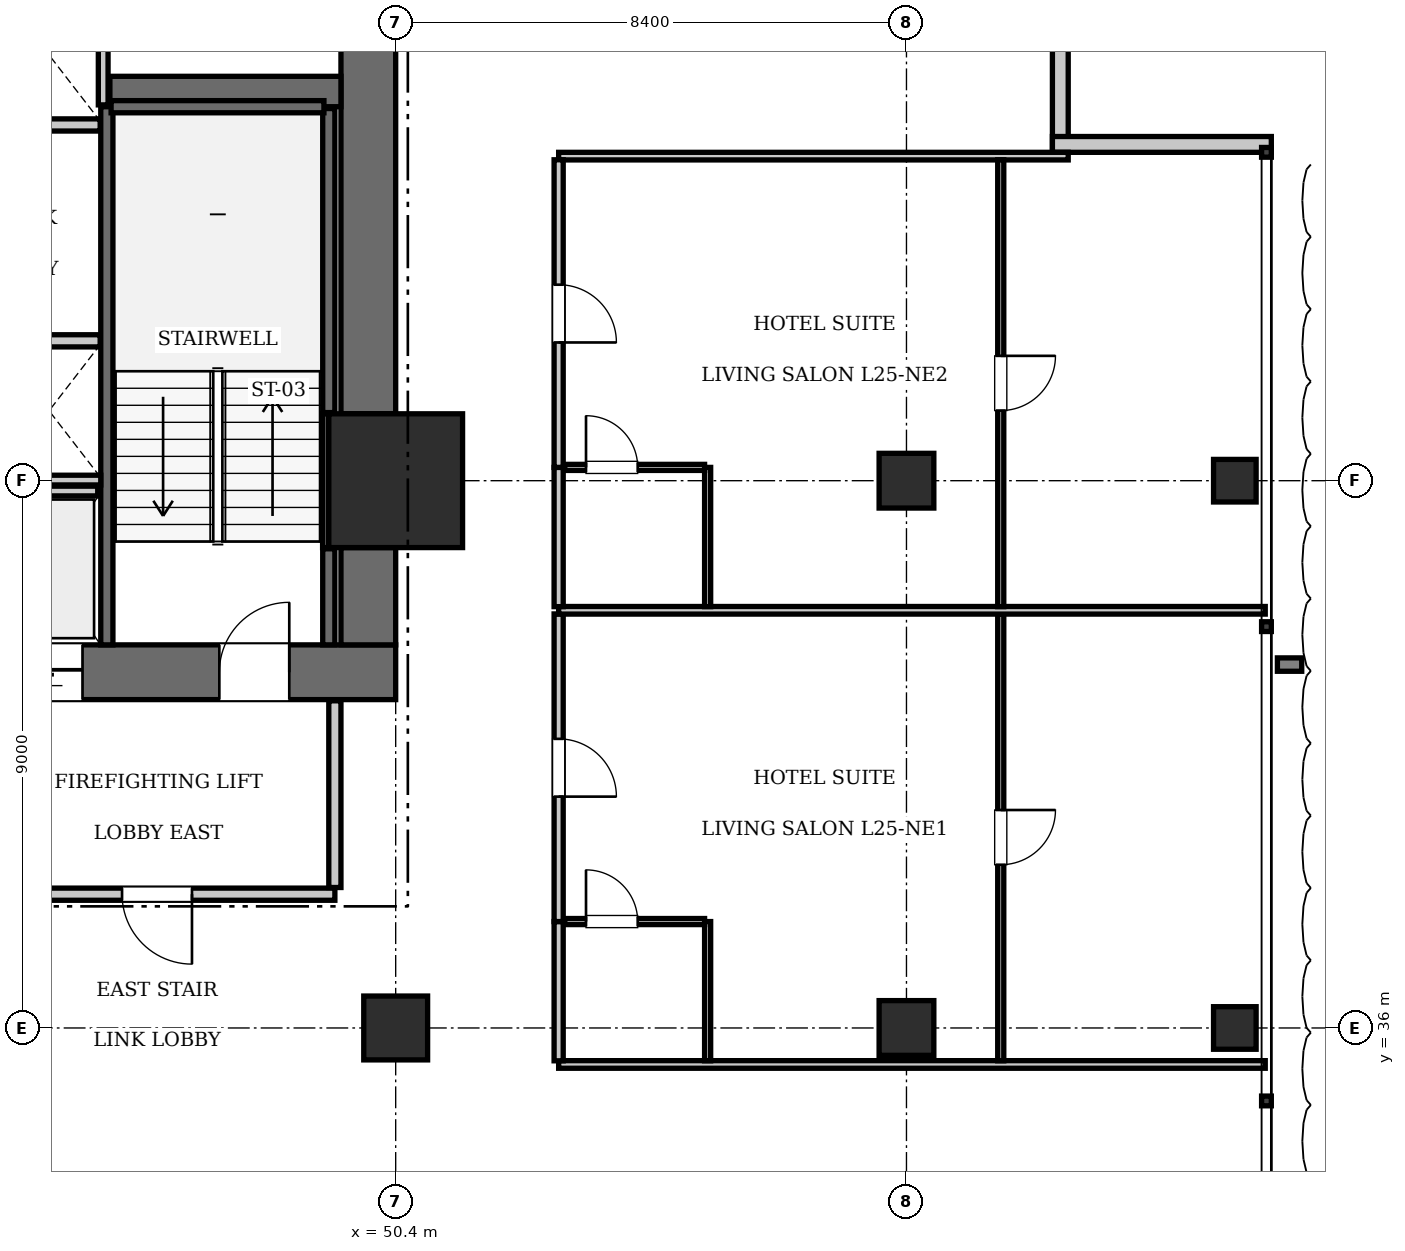
"""IFC4 building model, lengths in metres.
Left out: names, types, materials, properties, quantities, classifications, styles, units other than length and angle.
Written with IfcOpenShell. Run it as: python <this file> out.ifc"""

import sys

from ifc_helpers import new_model, si_unit, direction, frame, frame_2d, origin, origin_2d, place, context, subcontext, project, spatial, rectangle, i_section, extrude, element, fill, save


model = new_model("IFC4")
c1 = context("Model", 3, precision=1e-05, world=origin(), true_north=direction((0.0, 1.0)))
c2 = subcontext(c1, "Body", "Model", "MODEL_VIEW")
j1 = project(units=[si_unit("LENGTHUNIT", "METRE"), si_unit("PLANEANGLEUNIT", "RADIAN")], contexts=[c1])
p1 = place(None, origin())
s1 = spatial("IfcSite", under=j1, at=p1, CompositionType="ELEMENT")
p2 = place(p1, origin())
s2 = spatial("IfcBuilding", under=s1, at=p2, CompositionType="ELEMENT")
p3 = place(p2, frame((0.0, 0.0, 103.95)))
s3 = spatial("IfcBuildingStorey", under=s2, at=p3, CompositionType="ELEMENT", Elevation=103.95)
p4 = place(p3, frame((50.4, 45.0, 0.0), z_axis=(0.0, 0.0, 1.0), x_axis=(1.0, 0.0, 0.0)))
e1 = element("IfcColumn", 1, at=p4, inside=s3, PredefinedType="COLUMN", context=c2, shape_type="SweptSolid", body=[
    extrude(rectangle(XDim=2.2, YDim=2.2, at=origin_2d()), origin(), (0.0, 0.0, 1.0), 3.85),
])
p5 = place(p3, frame((43.6, 41.85, 0.0), z_axis=(0.0, 0.0, 1.0), x_axis=(1.0, 0.0, 0.0)))
e2 = element("IfcWall", 2, at=p5, inside=s3, PredefinedType="SHEAR", context=c2, shape_type="SweptSolid", body=[
    extrude(rectangle(XDim=6.8, YDim=0.9, at=frame_2d((3.4, 0.0))), origin(), (0.0, 0.0, 1.0), 3.85),
])
p6 = place(p5, frame((3.9, 0.0, 0.0)))
e3 = element("IfcOpeningElement", 3, at=p6, cuts=e2, PredefinedType="OPENING", context=c2, shape_type="SweptSolid", body=[
    extrude(rectangle(XDim=1.15, YDim=2.15, at=frame_2d((0.575, 1.075))), frame((0.0, 0.46, 0.0), z_axis=(0.0, -1.0, 0.0), x_axis=(1.0, 0.0, 0.0)), (0.0, 0.0, 1.0), 0.92),
])
p7 = place(p5, frame((0.55, 0.0, 0.0)))
e4 = element("IfcOpeningElement", 4, at=p7, cuts=e2, PredefinedType="OPENING", context=c2, shape_type="SweptSolid", body=[
    extrude(rectangle(XDim=1.1, YDim=2.2, at=frame_2d((0.55, 1.1))), frame((0.0, 0.46, 0.0), z_axis=(0.0, -1.0, 0.0), x_axis=(1.0, 0.0, 0.0)), (0.0, 0.0, 1.0), 0.92),
])
p8 = place(p3, frame((49.95, 42.3, 0.0), z_axis=(0.0, 0.0, 1.0), x_axis=(0.0, 1.0, 0.0)))
e5 = element("IfcWall", 5, at=p8, inside=s3, PredefinedType="SHEAR", context=c2, shape_type="SweptSolid", body=[
    extrude(rectangle(XDim=1.6, YDim=0.9, at=frame_2d((0.8, 0.0))), origin(), (0.0, 0.0, 1.0), 3.85),
])
p9 = place(p3, frame((49.95, 46.1, 0.0), z_axis=(0.0, 0.0, 1.0), x_axis=(0.0, 1.0, 0.0)))
e6 = element("IfcWall", 6, at=p9, inside=s3, PredefinedType="SHEAR", context=c2, shape_type="SweptSolid", body=[
    extrude(rectangle(XDim=7.0, YDim=0.9, at=frame_2d((3.5, 0.0))), origin(), (0.0, 0.0, 1.0), 3.85),
])
p10 = place(p3, frame((45.7, 51.4, 0.0), z_axis=(0.0, 0.0, 1.0), x_axis=(1.0, 0.0, 0.0)))
e7 = element("IfcWall", 7, at=p10, inside=s3, PredefinedType="SHEAR", context=c2, shape_type="SweptSolid", body=[
    extrude(rectangle(XDim=3.8, YDim=0.5, at=frame_2d((1.9, 0.0))), origin(), (0.0, 0.0, 1.0), 3.85),
])
p11 = place(p3, frame((50.4, 36.0, 0.0), z_axis=(0.0, 0.0, 1.0), x_axis=(1.0, 0.0, 0.0)))
e8 = element("IfcColumn", 8, at=p11, inside=s3, PredefinedType="COLUMN", context=c2, shape_type="SweptSolid", body=[
    extrude(rectangle(XDim=1.05, YDim=1.05, at=origin_2d()), origin(), (0.0, 0.0, 1.0), 3.85),
])
for number, where, z_axis, x_axis in (
    (9, (58.8, 36.0, 0.0), (0.0, 0.0, 1.0), (1.0, 0.0, 0.0)),
    (10, (58.8, 45.0, 0.0), (0.0, 0.0, 1.0), (1.0, 0.0, 0.0)),
):
    element("IfcColumn", number, at=place(p3, frame(where, z_axis=z_axis, x_axis=x_axis)), inside=s3, PredefinedType="COLUMN", context=c2, shape_type="SweptSolid", body=[
        extrude(rectangle(XDim=0.9, YDim=0.9, at=origin_2d()), origin(), (0.0, 0.0, 1.0), 3.85),
    ])
for number, where, z_axis, x_axis in (
    (11, (64.2, 36.0, 0.0), (0.0, 0.0, 1.0), (1.0, 0.0, 0.0)),
    (12, (64.2, 45.0, 0.0), (0.0, 0.0, 1.0), (1.0, 0.0, 0.0)),
):
    element("IfcColumn", number, at=place(p3, frame(where, z_axis=z_axis, x_axis=x_axis)), inside=s3, PredefinedType="COLUMN", context=c2, shape_type="SweptSolid", body=[
        extrude(i_section(OverallWidth=0.7, OverallDepth=0.7, WebThickness=0.028, FlangeThickness=0.044, at=origin_2d()), origin(), (0.0, 0.0, 1.0), 3.85),
    ])
p12 = place(p3, frame((45.65, 42.3, 0.0), z_axis=(0.0, 0.0, 1.0), x_axis=(0.0, 1.0, 0.0)))
e13 = element("IfcWall", 13, at=p12, inside=s3, PredefinedType="SOLIDWALL", context=c2, shape_type="SweptSolid", body=[
    extrude(rectangle(XDim=8.85, YDim=0.2, at=frame_2d((4.425, 0.0))), origin(), (0.0, 0.0, 1.0), 3.61),
])
p13 = place(p3, frame((49.3, 42.3, 0.0), z_axis=(0.0, 0.0, 1.0), x_axis=(0.0, 1.0, 0.0)))
e14 = element("IfcWall", 14, at=p13, inside=s3, PredefinedType="SOLIDWALL", context=c2, shape_type="SweptSolid", body=[
    extrude(rectangle(XDim=1.58, YDim=0.2, at=frame_2d((0.79, 0.0))), origin(), (0.0, 0.0, 1.0), 3.61),
])
p14 = place(p3, frame((49.3, 46.12, 0.0), z_axis=(0.0, 0.0, 1.0), x_axis=(0.0, 1.0, 0.0)))
e15 = element("IfcWall", 15, at=p14, inside=s3, PredefinedType="SOLIDWALL", context=c2, shape_type="SweptSolid", body=[
    extrude(rectangle(XDim=5.0, YDim=0.2, at=frame_2d((2.5, 0.0))), origin(), (0.0, 0.0, 1.0), 3.61),
])
p15 = place(p3, frame((45.72, 51.15, 0.0), z_axis=(0.0, 0.0, 1.0), x_axis=(1.0, 0.0, 0.0)))
e16 = element("IfcWall", 16, at=p15, inside=s3, PredefinedType="SOLIDWALL", context=c2, shape_type="SweptSolid", body=[
    extrude(rectangle(XDim=3.5, YDim=0.2, at=frame_2d((1.75, 0.0))), origin(), (0.0, 0.0, 1.0), 3.61),
])
p16 = place(p3, frame((49.248, 43.9, 0.0), z_axis=(0.0, 0.0, 1.0), x_axis=(0.0, 1.0, 0.0)))
e17 = element("IfcWall", 17, at=p16, inside=s3, PredefinedType="SOLIDWALL", context=c2, shape_type="SweptSolid", body=[
    extrude(rectangle(XDim=2.2, YDim=0.1, at=frame_2d((1.1, 0.0))), origin(), (0.0, 0.0, 1.0), 3.61),
])
for number, where, z_axis, x_axis in (
    (18, (43.86, 47.3, 0.0), (0.0, 0.0, 1.0), (1.0, 0.0, 0.0)),
    (19, (43.86, 50.85, 0.0), (0.0, 0.0, 1.0), (1.0, 0.0, 0.0)),
):
    element("IfcWall", number, at=place(p3, frame(where, z_axis=z_axis, x_axis=x_axis)), inside=s3, PredefinedType="SOLIDWALL", context=c2, shape_type="SweptSolid", body=[
        extrude(rectangle(XDim=1.68, YDim=0.2, at=frame_2d((0.84, 0.0))), origin(), (0.0, 0.0, 1.0), 3.61),
    ])
p17 = place(p3, frame((43.9, 44.83, 0.0), z_axis=(0.0, 0.0, 1.0), x_axis=(1.0, 0.0, 0.0)))
e20 = element("IfcWall", 20, at=p17, inside=s3, PredefinedType="SOLIDWALL", context=c2, shape_type="SweptSolid", body=[
    extrude(rectangle(XDim=1.6, YDim=0.16, at=frame_2d((0.8, 0.0))), origin(), (0.0, 0.0, 1.0), 3.61),
])
p18 = place(p3, frame((42.1, 45.01, 0.0), z_axis=(0.0, 0.0, 1.0), x_axis=(1.0, 0.0, 0.0)))
e21 = element("IfcWall", 21, at=p18, inside=s3, PredefinedType="SOLIDWALL", context=c2, shape_type="SweptSolid", body=[
    extrude(rectangle(XDim=3.45, YDim=0.16, at=frame_2d((1.725, 0.0))), origin(), (0.0, 0.0, 1.0), 3.61),
])
p19 = place(p3, frame((45.59, 51.18, 0.0), z_axis=(0.0, 0.0, 1.0), x_axis=(0.0, 1.0, 0.0)))
e22 = element("IfcWall", 22, at=p19, inside=s3, PredefinedType="SOLIDWALL", context=c2, shape_type="SweptSolid", body=[
    extrude(rectangle(XDim=1.92, YDim=0.16, at=frame_2d((0.96, 0.0))), origin(), (0.0, 0.0, 1.0), 3.61),
])
for number, where, z_axis, x_axis in (
    (23, (61.33, 54.0, 0.0), (0.0, 0.0, 1.0), (0.0, -1.0, 0.0)),
    (24, (61.2, 50.53, 0.0), (0.0, 0.0, 1.0), (1.0, 0.0, 0.0)),
):
    element("IfcWall", number, at=place(p3, frame(where, z_axis=z_axis, x_axis=x_axis)), inside=s3, PredefinedType="SOLIDWALL", context=c2, shape_type="SweptSolid", body=[
        extrude(rectangle(XDim=3.6, YDim=0.26, at=frame_2d((1.8, 0.0))), origin(), (0.0, 0.0, 1.0), 3.61),
    ])
p20 = place(p3, frame((43.6, 38.2, 0.0), z_axis=(0.0, 0.0, 1.0), x_axis=(1.0, 0.0, 0.0)))
e25 = element("IfcWall", 25, at=p20, inside=s3, PredefinedType="PARTITIONING", context=c2, shape_type="SweptSolid", body=[
    extrude(rectangle(XDim=5.8, YDim=0.2, at=frame_2d((2.9, 0.0))), origin(), (0.0, 0.0, 1.0), 3.61),
])
p21 = place(p20, frame((2.3, 0.0, 0.0)))
e26 = element("IfcOpeningElement", 26, at=p21, cuts=e25, PredefinedType="OPENING", context=c2, shape_type="SweptSolid", body=[
    extrude(rectangle(XDim=1.15, YDim=2.15, at=frame_2d((0.575, 1.075))), frame((0.0, 0.11, 0.0), z_axis=(0.0, -1.0, 0.0), x_axis=(1.0, 0.0, 0.0)), (0.0, 0.0, 1.0), 0.22),
])
p22 = place(p3, frame((49.4, 38.31, 0.0), z_axis=(0.0, 0.0, 1.0), x_axis=(0.0, 1.0, 0.0)))
e27 = element("IfcWall", 27, at=p22, inside=s3, PredefinedType="PARTITIONING", context=c2, shape_type="SweptSolid", body=[
    extrude(rectangle(XDim=3.07, YDim=0.2, at=frame_2d((1.535, 0.0))), origin(), (0.0, 0.0, 1.0), 3.61),
])
p23 = place(p3, frame((53.08, 35.4, 0.0), z_axis=(0.0, 0.0, 1.0), x_axis=(1.0, 0.0, 0.0)))
e28 = element("IfcWall", 28, at=p23, inside=s3, PredefinedType="PARTITIONING", context=c2, shape_type="SweptSolid", body=[
    extrude(rectangle(XDim=11.62, YDim=0.125, at=frame_2d((5.81, 0.0))), origin(), (0.0, 0.0, 1.0), 3.61),
])
p24 = place(p3, frame((53.08, 50.337, 0.0), z_axis=(0.0, 0.0, 1.0), x_axis=(1.0, 0.0, 0.0)))
e29 = element("IfcWall", 29, at=p24, inside=s3, PredefinedType="PARTITIONING", context=c2, shape_type="SweptSolid", body=[
    extrude(rectangle(XDim=8.38, YDim=0.125, at=frame_2d((4.19, 0.0))), origin(), (0.0, 0.0, 1.0), 3.61),
])
p25 = place(p3, frame((53.08, 35.46, 0.0), z_axis=(0.0, 0.0, 1.0), x_axis=(0.0, 1.0, 0.0)))
e30 = element("IfcWall", 30, at=p25, inside=s3, PredefinedType="PARTITIONING", context=c2, shape_type="SweptSolid", body=[
    extrude(rectangle(XDim=2.29, YDim=0.15, at=frame_2d((1.145, 0.0))), origin(), (0.0, 0.0, 1.0), 3.61),
])
p26 = place(p3, frame((53.08, 37.75, 0.0), z_axis=(0.0, 0.0, 1.0), x_axis=(0.0, 1.0, 0.0)))
e31 = element("IfcWall", 31, at=p26, inside=s3, PredefinedType="PARTITIONING", context=c2, shape_type="SweptSolid", body=[
    extrude(rectangle(XDim=5.059, YDim=0.15, at=frame_2d((2.529, 0.0))), origin(), (0.0, 0.0, 1.0), 3.61),
])
p27 = place(p26, frame((2.054, 0.0, 0.0)))
e32 = element("IfcOpeningElement", 32, at=p27, cuts=e31, PredefinedType="OPENING", context=c2, shape_type="SweptSolid", body=[
    extrude(rectangle(XDim=0.95, YDim=2.15, at=frame_2d((0.475, 1.075))), frame((0.0, 0.085, 0.0), z_axis=(0.0, -1.0, 0.0), x_axis=(1.0, 0.0, 0.0)), (0.0, 0.0, 1.0), 0.17),
])
p28 = place(p3, frame((55.53, 35.46, 0.0), z_axis=(0.0, 0.0, 1.0), x_axis=(0.0, 1.0, 0.0)))
e33 = element("IfcWall", 33, at=p28, inside=s3, PredefinedType="PARTITIONING", context=c2, shape_type="SweptSolid", body=[
    extrude(rectangle(XDim=2.29, YDim=0.1, at=frame_2d((1.145, 0.0))), origin(), (0.0, 0.0, 1.0), 3.61),
])
p29 = place(p3, frame((53.18, 37.75, 0.0), z_axis=(0.0, 0.0, 1.0), x_axis=(1.0, 0.0, 0.0)))
e34 = element("IfcWall", 34, at=p29, inside=s3, PredefinedType="PARTITIONING", context=c2, shape_type="SweptSolid", body=[
    extrude(rectangle(XDim=2.3, YDim=0.1, at=frame_2d((1.15, 0.0))), origin(), (0.0, 0.0, 1.0), 3.61),
])
p30 = place(p29, frame((0.35, 0.0, 0.0)))
e35 = element("IfcOpeningElement", 35, at=p30, cuts=e34, PredefinedType="OPENING", context=c2, shape_type="SweptSolid", body=[
    extrude(rectangle(XDim=0.85, YDim=2.1, at=frame_2d((0.425, 1.05))), frame((0.0, 0.06, 0.0), z_axis=(0.0, -1.0, 0.0), x_axis=(1.0, 0.0, 0.0)), (0.0, 0.0, 1.0), 0.12),
])
p31 = place(p3, frame((60.35, 35.46, 0.0), z_axis=(0.0, 0.0, 1.0), x_axis=(0.0, 1.0, 0.0)))
e36 = element("IfcWall", 36, at=p31, inside=s3, PredefinedType="PARTITIONING", context=c2, shape_type="SweptSolid", body=[
    extrude(rectangle(XDim=7.349, YDim=0.1, at=frame_2d((3.674, 0.0))), origin(), (0.0, 0.0, 1.0), 3.61),
])
p32 = place(p31, frame((3.224, 0.0, 0.0)))
e37 = element("IfcOpeningElement", 37, at=p32, cuts=e36, PredefinedType="OPENING", context=c2, shape_type="SweptSolid", body=[
    extrude(rectangle(XDim=0.9, YDim=2.1, at=frame_2d((0.45, 1.05))), frame((0.0, 0.06, 0.0), z_axis=(0.0, -1.0, 0.0), x_axis=(1.0, 0.0, 0.0)), (0.0, 0.0, 1.0), 0.12),
])
p33 = place(p3, frame((53.08, 42.869, 0.0), z_axis=(0.0, 0.0, 1.0), x_axis=(1.0, 0.0, 0.0)))
e38 = element("IfcWall", 38, at=p33, inside=s3, PredefinedType="PARTITIONING", context=c2, shape_type="SweptSolid", body=[
    extrude(rectangle(XDim=11.62, YDim=0.125, at=frame_2d((5.81, 0.0))), origin(), (0.0, 0.0, 1.0), 3.61),
])
p34 = place(p3, frame((53.08, 42.929, 0.0), z_axis=(0.0, 0.0, 1.0), x_axis=(0.0, 1.0, 0.0)))
e39 = element("IfcWall", 39, at=p34, inside=s3, PredefinedType="PARTITIONING", context=c2, shape_type="SweptSolid", body=[
    extrude(rectangle(XDim=2.29, YDim=0.15, at=frame_2d((1.145, 0.0))), origin(), (0.0, 0.0, 1.0), 3.61),
])
p35 = place(p3, frame((53.08, 45.219, 0.0), z_axis=(0.0, 0.0, 1.0), x_axis=(0.0, 1.0, 0.0)))
e40 = element("IfcWall", 40, at=p35, inside=s3, PredefinedType="PARTITIONING", context=c2, shape_type="SweptSolid", body=[
    extrude(rectangle(XDim=5.059, YDim=0.15, at=frame_2d((2.529, 0.0))), origin(), (0.0, 0.0, 1.0), 3.61),
])
p36 = place(p35, frame((2.054, 0.0, 0.0)))
e41 = element("IfcOpeningElement", 41, at=p36, cuts=e40, PredefinedType="OPENING", context=c2, shape_type="SweptSolid", body=[
    extrude(rectangle(XDim=0.95, YDim=2.15, at=frame_2d((0.475, 1.075))), frame((0.0, 0.085, 0.0), z_axis=(0.0, -1.0, 0.0), x_axis=(1.0, 0.0, 0.0)), (0.0, 0.0, 1.0), 0.17),
])
p37 = place(p3, frame((55.53, 42.929, 0.0), z_axis=(0.0, 0.0, 1.0), x_axis=(0.0, 1.0, 0.0)))
e42 = element("IfcWall", 42, at=p37, inside=s3, PredefinedType="PARTITIONING", context=c2, shape_type="SweptSolid", body=[
    extrude(rectangle(XDim=2.29, YDim=0.1, at=frame_2d((1.145, 0.0))), origin(), (0.0, 0.0, 1.0), 3.61),
])
p38 = place(p3, frame((53.18, 45.219, 0.0), z_axis=(0.0, 0.0, 1.0), x_axis=(1.0, 0.0, 0.0)))
e43 = element("IfcWall", 43, at=p38, inside=s3, PredefinedType="PARTITIONING", context=c2, shape_type="SweptSolid", body=[
    extrude(rectangle(XDim=2.3, YDim=0.1, at=frame_2d((1.15, 0.0))), origin(), (0.0, 0.0, 1.0), 3.61),
])
p39 = place(p38, frame((0.35, 0.0, 0.0)))
e44 = element("IfcOpeningElement", 44, at=p39, cuts=e43, PredefinedType="OPENING", context=c2, shape_type="SweptSolid", body=[
    extrude(rectangle(XDim=0.85, YDim=2.1, at=frame_2d((0.425, 1.05))), frame((0.0, 0.06, 0.0), z_axis=(0.0, -1.0, 0.0), x_axis=(1.0, 0.0, 0.0)), (0.0, 0.0, 1.0), 0.12),
])
p40 = place(p3, frame((60.35, 42.929, 0.0), z_axis=(0.0, 0.0, 1.0), x_axis=(0.0, 1.0, 0.0)))
e45 = element("IfcWall", 45, at=p40, inside=s3, PredefinedType="PARTITIONING", context=c2, shape_type="SweptSolid", body=[
    extrude(rectangle(XDim=7.349, YDim=0.1, at=frame_2d((3.674, 0.0))), origin(), (0.0, 0.0, 1.0), 3.61),
])
p41 = place(p40, frame((3.224, 0.0, 0.0)))
e46 = element("IfcOpeningElement", 46, at=p41, cuts=e45, PredefinedType="OPENING", context=c2, shape_type="SweptSolid", body=[
    extrude(rectangle(XDim=0.9, YDim=2.1, at=frame_2d((0.45, 1.05))), frame((0.0, 0.06, 0.0), z_axis=(0.0, -1.0, 0.0), x_axis=(1.0, 0.0, 0.0)), (0.0, 0.0, 1.0), 0.12),
])
p42 = place(p6, origin())
e47 = element("IfcDoor", 47, at=p42, inside=s3, OperationType="SINGLE_SWING_RIGHT", PredefinedType="DOOR", context=c2, shape_type="SweptSolid", body=[
    extrude(rectangle(XDim=1.15, YDim=2.15, at=frame_2d((0.575, 1.075))), frame((0.0, 0.025, 0.0), z_axis=(0.0, -1.0, 0.0), x_axis=(1.0, 0.0, 0.0)), (0.0, 0.0, 1.0), 0.05),
])
fill(e3, e47)
p43 = place(p7, frame((1.1, 0.0, 0.0), z_axis=(0.0, 0.0, 1.0), x_axis=(-1.0, 0.0, 0.0)))
e48 = element("IfcDoor", 48, at=p43, inside=s3, OperationType="SLIDING_TO_LEFT", PredefinedType="DOOR", context=c2, shape_type="SweptSolid", body=[
    extrude(rectangle(XDim=1.1, YDim=2.2, at=frame_2d((0.55, 1.1))), frame((0.0, 0.025, 0.0), z_axis=(0.0, -1.0, 0.0), x_axis=(1.0, 0.0, 0.0)), (0.0, 0.0, 1.0), 0.05),
])
fill(e4, e48)
p44 = place(p21, frame((1.15, 0.0, 0.0), z_axis=(0.0, 0.0, 1.0), x_axis=(-1.0, 0.0, 0.0)))
e49 = element("IfcDoor", 49, at=p44, inside=s3, OperationType="SINGLE_SWING_LEFT", PredefinedType="DOOR", context=c2, shape_type="SweptSolid", body=[
    extrude(rectangle(XDim=1.15, YDim=2.15, at=frame_2d((0.575, 1.075))), frame((0.0, 0.025, 0.0), z_axis=(0.0, -1.0, 0.0), x_axis=(1.0, 0.0, 0.0)), (0.0, 0.0, 1.0), 0.05),
])
fill(e26, e49)
p45 = place(p30, origin())
e50 = element("IfcDoor", 50, at=p45, inside=s3, OperationType="SINGLE_SWING_LEFT", PredefinedType="DOOR", context=c2, shape_type="SweptSolid", body=[
    extrude(rectangle(XDim=0.85, YDim=2.1, at=frame_2d((0.425, 1.05))), frame((0.0, 0.025, 0.0), z_axis=(0.0, -1.0, 0.0), x_axis=(1.0, 0.0, 0.0)), (0.0, 0.0, 1.0), 0.05),
])
fill(e35, e50)
p46 = place(p27, frame((0.95, 0.0, 0.0), z_axis=(0.0, 0.0, 1.0), x_axis=(-1.0, 0.0, 0.0)))
e51 = element("IfcDoor", 51, at=p46, inside=s3, OperationType="SINGLE_SWING_RIGHT", PredefinedType="DOOR", context=c2, shape_type="SweptSolid", body=[
    extrude(rectangle(XDim=0.95, YDim=2.15, at=frame_2d((0.475, 1.075))), frame((0.0, 0.025, 0.0), z_axis=(0.0, -1.0, 0.0), x_axis=(1.0, 0.0, 0.0)), (0.0, 0.0, 1.0), 0.05),
])
fill(e32, e51)
p47 = place(p32, frame((0.9, 0.0, 0.0), z_axis=(0.0, 0.0, 1.0), x_axis=(-1.0, 0.0, 0.0)))
e52 = element("IfcDoor", 52, at=p47, inside=s3, OperationType="SINGLE_SWING_LEFT", PredefinedType="DOOR", context=c2, shape_type="SweptSolid", body=[
    extrude(rectangle(XDim=0.9, YDim=2.1, at=frame_2d((0.45, 1.05))), frame((0.0, 0.025, 0.0), z_axis=(0.0, -1.0, 0.0), x_axis=(1.0, 0.0, 0.0)), (0.0, 0.0, 1.0), 0.05),
])
fill(e37, e52)
p48 = place(p39, origin())
e53 = element("IfcDoor", 53, at=p48, inside=s3, OperationType="SINGLE_SWING_LEFT", PredefinedType="DOOR", context=c2, shape_type="SweptSolid", body=[
    extrude(rectangle(XDim=0.85, YDim=2.1, at=frame_2d((0.425, 1.05))), frame((0.0, 0.025, 0.0), z_axis=(0.0, -1.0, 0.0), x_axis=(1.0, 0.0, 0.0)), (0.0, 0.0, 1.0), 0.05),
])
fill(e44, e53)
p49 = place(p36, frame((0.95, 0.0, 0.0), z_axis=(0.0, 0.0, 1.0), x_axis=(-1.0, 0.0, 0.0)))
e54 = element("IfcDoor", 54, at=p49, inside=s3, OperationType="SINGLE_SWING_RIGHT", PredefinedType="DOOR", context=c2, shape_type="SweptSolid", body=[
    extrude(rectangle(XDim=0.95, YDim=2.15, at=frame_2d((0.475, 1.075))), frame((0.0, 0.025, 0.0), z_axis=(0.0, -1.0, 0.0), x_axis=(1.0, 0.0, 0.0)), (0.0, 0.0, 1.0), 0.05),
])
fill(e41, e54)
p50 = place(p41, frame((0.9, 0.0, 0.0), z_axis=(0.0, 0.0, 1.0), x_axis=(-1.0, 0.0, 0.0)))
e55 = element("IfcDoor", 55, at=p50, inside=s3, OperationType="SINGLE_SWING_LEFT", PredefinedType="DOOR", context=c2, shape_type="SweptSolid", body=[
    extrude(rectangle(XDim=0.9, YDim=2.1, at=frame_2d((0.45, 1.05))), frame((0.0, 0.025, 0.0), z_axis=(0.0, -1.0, 0.0), x_axis=(1.0, 0.0, 0.0)), (0.0, 0.0, 1.0), 0.05),
])
fill(e46, e55)
save(model, sys.argv[1])
